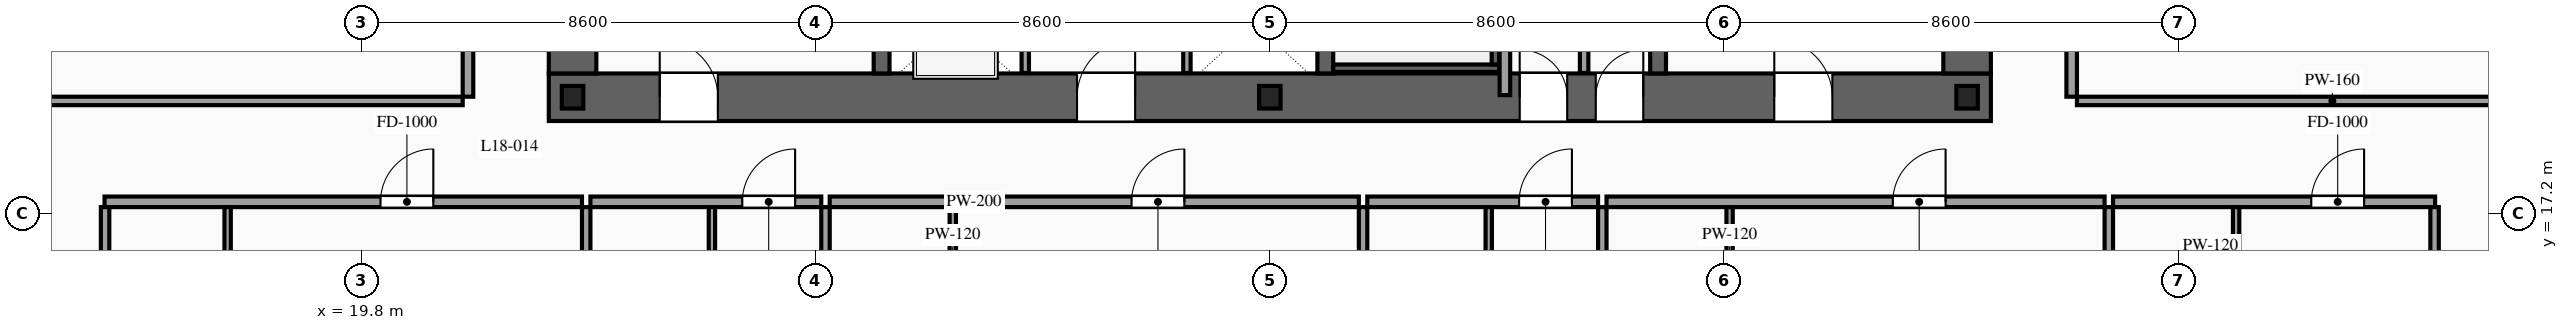
"""IFC4 building model, lengths in metres.
Left out: names, types, materials, properties, quantities, classifications, styles, units other than length and angle.
Written with IfcOpenShell. Run it as: python <this file> out.ifc"""

import sys

from ifc_helpers import new_model, si_unit, direction, frame, frame_2d, origin, origin_2d, place, context, subcontext, project, spatial, rectangle, i_section, extrude, source, transform, mapped, element, fill, save


model = new_model("IFC4")
c1 = context("Model", 3, precision=1e-05, world=origin(), true_north=direction((0.0, 1.0)))
c2 = subcontext(c1, "Body", "Model", "MODEL_VIEW")
j1 = project(units=[si_unit("LENGTHUNIT", "METRE"), si_unit("PLANEANGLEUNIT", "RADIAN")], contexts=[c1])
p1 = place(None, origin())
s1 = spatial("IfcSite", under=j1, at=p1, CompositionType="ELEMENT")
p2 = place(p1, origin())
s2 = spatial("IfcBuilding", under=s1, at=p2, CompositionType="ELEMENT")
p3 = place(p2, frame((0.0, 0.0, 71.2)))
s3 = spatial("IfcBuildingStorey", under=s2, at=p3, CompositionType="ELEMENT", Elevation=71.2)
p4 = place(p3, frame((23.35, 19.4, 0.0), z_axis=(0.0, 0.0, 1.0), x_axis=(1.0, 0.0, 0.0)))
e1 = element("IfcWall", 1, at=p4, inside=s3, PredefinedType="SHEAR", context=c2, shape_type="SweptSolid", body=[
    extrude(rectangle(XDim=27.3, YDim=0.9, at=frame_2d((13.65, 0.0))), origin(), (0.0, 0.0, 1.0), 3.6),
])
p5 = place(p4, frame((2.1, 0.0, 0.0)))
e2 = element("IfcOpeningElement", 2, at=p5, cuts=e1, PredefinedType="OPENING", context=c2, shape_type="SweptSolid", body=[
    extrude(rectangle(XDim=1.1, YDim=2.2, at=frame_2d((0.55, 1.1))), frame((0.0, 0.465, 0.0), z_axis=(0.0, -1.0, 0.0), x_axis=(1.0, 0.0, 0.0)), (0.0, 0.0, 1.0), 0.93),
])
p6 = place(p4, frame((10.0, 0.0, 0.0)))
e3 = element("IfcOpeningElement", 3, at=p6, cuts=e1, PredefinedType="OPENING", context=c2, shape_type="SweptSolid", body=[
    extrude(rectangle(XDim=1.1, YDim=2.2, at=frame_2d((0.55, 1.1))), frame((0.0, 0.465, 0.0), z_axis=(0.0, -1.0, 0.0), x_axis=(1.0, 0.0, 0.0)), (0.0, 0.0, 1.0), 0.93),
])
p7 = place(p4, frame((23.2, 0.0, 0.0)))
e4 = element("IfcOpeningElement", 4, at=p7, cuts=e1, PredefinedType="OPENING", context=c2, shape_type="SweptSolid", body=[
    extrude(rectangle(XDim=1.1, YDim=2.2, at=frame_2d((0.55, 1.1))), frame((0.0, 0.465, 0.0), z_axis=(0.0, -1.0, 0.0), x_axis=(1.0, 0.0, 0.0)), (0.0, 0.0, 1.0), 0.93),
])
p8 = place(p4, frame((19.82, 0.0, 0.0)))
e5 = element("IfcOpeningElement", 5, at=p8, cuts=e1, PredefinedType="OPENING", context=c2, shape_type="SweptSolid", body=[
    extrude(rectangle(XDim=0.9, YDim=2.15, at=frame_2d((0.45, 1.075))), frame((0.0, 0.465, 0.0), z_axis=(0.0, -1.0, 0.0), x_axis=(1.0, 0.0, 0.0)), (0.0, 0.0, 1.0), 0.93),
])
p9 = place(p4, frame((18.38, 0.0, 0.0)))
e6 = element("IfcOpeningElement", 6, at=p9, cuts=e1, PredefinedType="OPENING", context=c2, shape_type="SweptSolid", body=[
    extrude(rectangle(XDim=0.9, YDim=2.15, at=frame_2d((0.45, 1.075))), frame((0.0, 0.465, 0.0), z_axis=(0.0, -1.0, 0.0), x_axis=(1.0, 0.0, 0.0)), (0.0, 0.0, 1.0), 0.93),
])
m1 = source(origin(), c2, "Body", "SweptSolid", [
    extrude(rectangle(XDim=11.9, YDim=0.9, at=frame_2d((5.95, 0.0))), origin(), (0.0, 0.0, 1.0), 3.6),
])
for number, where, z_axis, x_axis in (
    (7, (23.8, 19.85, 0.0), (0.0, 0.0, 1.0), (0.0, 1.0, 0.0)),
    (8, (50.2, 19.85, 0.0), (0.0, 0.0, 1.0), (0.0, 1.0, 0.0)),
):
    element("IfcWall", number, at=place(p3, frame(where, z_axis=z_axis, x_axis=x_axis)), inside=s3, PredefinedType="SHEAR", context=c2, shape_type="MappedRepresentation", body=[
        mapped(m1, transform((0.0, 0.0, 0.0), scale=1.0)),
    ])
m2 = source(origin(), c2, "Body", "SweptSolid", [
    extrude(rectangle(XDim=11.9, YDim=0.3, at=frame_2d((5.95, 0.0))), origin(), (0.0, 0.0, 1.0), 3.6),
])
for number, where, z_axis, x_axis in (
    (9, (29.65, 19.85, 0.0), (0.0, 0.0, 1.0), (0.0, 1.0, 0.0)),
    (10, (38.05, 19.85, 0.0), (0.0, 0.0, 1.0), (0.0, 1.0, 0.0)),
    (11, (44.35, 19.85, 0.0), (0.0, 0.0, 1.0), (0.0, 1.0, 0.0)),
):
    element("IfcWall", number, at=place(p3, frame(where, z_axis=z_axis, x_axis=x_axis)), inside=s3, PredefinedType="SOLIDWALL", context=c2, shape_type="MappedRepresentation", body=[
        mapped(m2, transform((0.0, 0.0, 0.0), scale=1.0)),
    ])
m3 = source(origin(), c2, "Body", "SweptSolid", [
    extrude(i_section(OverallWidth=0.407, OverallDepth=0.428, WebThickness=0.02, FlangeThickness=0.035, at=origin_2d()), origin(), (0.0, 0.0, 1.0), 3.6),
])
for number, where, z_axis, x_axis in (
    (12, (23.8, 19.4, 0.0), (0.0, 0.0, 1.0), (1.0, 0.0, 0.0)),
    (13, (37.0, 19.4, 0.0), (0.0, 0.0, 1.0), (1.0, 0.0, 0.0)),
    (14, (50.2, 19.4, 0.0), (0.0, 0.0, 1.0), (1.0, 0.0, 0.0)),
):
    element("IfcColumn", number, at=place(p3, frame(where, z_axis=z_axis, x_axis=x_axis)), inside=s3, PredefinedType="COLUMN", context=c2, shape_type="MappedRepresentation", body=[
        mapped(m3, transform((0.0, 0.0, 0.0), scale=1.0)),
    ])
p10 = place(p3, frame((32.37, 19.86, 0.0), z_axis=(0.0, 0.0, 1.0), x_axis=(0.0, 1.0, 0.0)))
e15 = element("IfcWall", 15, at=p10, inside=s3, PredefinedType="SOLIDWALL", context=c2, shape_type="SweptSolid", body=[
    extrude(rectangle(XDim=2.04, YDim=0.14, at=frame_2d((1.02, 0.0))), origin(), (0.0, 0.0, 1.0), 3.38),
])
p11 = place(p10, frame((0.47, 0.0, 0.0)))
e16 = element("IfcOpeningElement", 16, at=p11, cuts=e15, PredefinedType="OPENING", context=c2, shape_type="SweptSolid", body=[
    extrude(rectangle(XDim=1.1, YDim=2.2, at=frame_2d((0.55, 1.1))), frame((0.0, 0.085, 0.0), z_axis=(0.0, -1.0, 0.0), x_axis=(1.0, 0.0, 0.0)), (0.0, 0.0, 1.0), 0.17),
])
m4 = source(origin(), c2, "Body", "SweptSolid", [
    extrude(rectangle(XDim=2.04, YDim=0.14, at=frame_2d((1.02, 0.0))), origin(), (0.0, 0.0, 1.0), 3.38),
])
p12 = place(p3, frame((35.43, 19.86, 0.0), z_axis=(0.0, 0.0, 1.0), x_axis=(0.0, 1.0, 0.0)))
e17 = element("IfcWall", 17, at=p12, inside=s3, PredefinedType="SOLIDWALL", context=c2, shape_type="MappedRepresentation", body=[
    mapped(m4, transform((0.0, 0.0, 0.0), scale=1.0)),
])
m5 = source(origin(), c2, "Body", "SweptSolid", [
    extrude(rectangle(XDim=3.14, YDim=0.14, at=frame_2d((1.57, 0.0))), origin(), (0.0, 0.0, 1.0), 3.38),
])
p13 = place(p3, frame((38.2, 19.95, 0.0), z_axis=(0.0, 0.0, 1.0), x_axis=(1.0, 0.0, 0.0)))
e18 = element("IfcWall", 18, at=p13, inside=s3, PredefinedType="SOLIDWALL", context=c2, shape_type="MappedRepresentation", body=[
    mapped(m5, transform((0.0, 0.0, 0.0), scale=1.0)),
])
m6 = source(origin(), c2, "Body", "SweptSolid", [
    extrude(rectangle(XDim=8.94, YDim=0.14, at=frame_2d((4.47, 0.0))), origin(), (0.0, 0.0, 1.0), 3.38),
])
p14 = place(p3, frame((41.27, 20.02, 0.0), z_axis=(0.0, 0.0, 1.0), x_axis=(0.0, 1.0, 0.0)))
e19 = element("IfcWall", 19, at=p14, inside=s3, PredefinedType="SOLIDWALL", context=c2, shape_type="MappedRepresentation", body=[
    mapped(m6, transform((0.0, 0.0, 0.0), scale=1.0)),
])
m7 = source(origin(), c2, "Body", "SweptSolid", [
    extrude(rectangle(XDim=1.34, YDim=0.16, at=frame_2d((0.67, 0.0))), origin(), (0.0, 0.0, 1.0), 3.38),
])
p15 = place(p3, frame((42.95, 19.86, 0.0), z_axis=(0.0, 0.0, 1.0), x_axis=(0.0, 1.0, 0.0)))
e20 = element("IfcWall", 20, at=p15, inside=s3, PredefinedType="PARTITIONING", context=c2, shape_type="MappedRepresentation", body=[
    mapped(m7, transform((0.0, 0.0, 0.0), scale=1.0)),
])
m8 = source(origin(), c2, "Body", "SweptSolid", [
    extrude(rectangle(XDim=6.51, YDim=0.2, at=frame_2d((3.255, 0.0))), origin(), (0.0, 0.0, 1.0), 3.38),
])
p16 = place(p3, frame((41.45, 19.44, 0.0), z_axis=(0.0, 0.0, 1.0), x_axis=(0.0, 1.0, 0.0)))
e21 = element("IfcWall", 21, at=p16, inside=s3, PredefinedType="PARTITIONING", context=c2, shape_type="MappedRepresentation", body=[
    mapped(m8, transform((0.0, 0.0, 0.0), scale=1.0)),
])
p17 = place(p3, frame((14.94, 17.42, 0.0), z_axis=(0.0, 0.0, 1.0), x_axis=(1.0, 0.0, 0.0)))
e22 = element("IfcWall", 22, at=p17, inside=s3, PredefinedType="PARTITIONING", context=c2, shape_type="SweptSolid", body=[
    extrude(rectangle(XDim=9.038, YDim=0.2, at=frame_2d((4.519, 0.0))), origin(), (0.0, 0.0, 1.0), 3.38),
])
p18 = place(p17, frame((5.224, 0.0, 0.0)))
e23 = element("IfcOpeningElement", 23, at=p18, cuts=e22, PredefinedType="OPENING", context=c2, shape_type="SweptSolid", body=[
    extrude(rectangle(XDim=1.0, YDim=2.2, at=frame_2d((0.5, 1.1))), frame((0.0, 0.115, 0.0), z_axis=(0.0, -1.0, 0.0), x_axis=(1.0, 0.0, 0.0)), (0.0, 0.0, 1.0), 0.23),
])
m9 = source(origin(), c2, "Body", "SweptSolid", [
    extrude(rectangle(XDim=16.47, YDim=0.16, at=frame_2d((8.235, 0.0))), origin(), (0.0, 0.0, 1.0), 3.38),
])
p19 = place(p3, frame((24.058, 0.85, 0.0), z_axis=(0.0, 0.0, 1.0), x_axis=(0.0, 1.0, 0.0)))
e24 = element("IfcWall", 24, at=p19, inside=s3, PredefinedType="PARTITIONING", context=c2, shape_type="MappedRepresentation", body=[
    mapped(m9, transform((0.0, 0.0, 0.0), scale=1.0)),
])
m10 = source(origin(), c2, "Body", "SweptSolid", [
    extrude(rectangle(XDim=2.42, YDim=0.12, at=frame_2d((1.21, 0.0))), origin(), (0.0, 0.0, 1.0), 3.38),
])
p20 = place(p3, frame((17.27, 14.9, 0.0), z_axis=(0.0, 0.0, 1.0), x_axis=(0.0, 1.0, 0.0)))
e25 = element("IfcWall", 25, at=p20, inside=s3, PredefinedType="PARTITIONING", context=c2, shape_type="MappedRepresentation", body=[
    mapped(m10, transform((0.0, 0.0, 0.0), scale=1.0)),
])
p21 = place(p3, frame((24.138, 17.42, 0.0), z_axis=(0.0, 0.0, 1.0), x_axis=(1.0, 0.0, 0.0)))
e26 = element("IfcWall", 26, at=p21, inside=s3, PredefinedType="PARTITIONING", context=c2, shape_type="SweptSolid", body=[
    extrude(rectangle(XDim=4.37, YDim=0.2, at=frame_2d((2.185, 0.0))), origin(), (0.0, 0.0, 1.0), 3.38),
])
p22 = place(p21, frame((2.875, 0.0, 0.0)))
e27 = element("IfcOpeningElement", 27, at=p22, cuts=e26, PredefinedType="OPENING", context=c2, shape_type="SweptSolid", body=[
    extrude(rectangle(XDim=1.0, YDim=2.2, at=frame_2d((0.5, 1.1))), frame((0.0, 0.115, 0.0), z_axis=(0.0, -1.0, 0.0), x_axis=(1.0, 0.0, 0.0)), (0.0, 0.0, 1.0), 0.23),
])
p23 = place(p3, frame((28.588, 0.85, 0.0), z_axis=(0.0, 0.0, 1.0), x_axis=(0.0, 1.0, 0.0)))
e28 = element("IfcWall", 28, at=p23, inside=s3, PredefinedType="PARTITIONING", context=c2, shape_type="MappedRepresentation", body=[
    mapped(m9, transform((0.0, 0.0, 0.0), scale=1.0)),
])
p24 = place(p3, frame((26.438, 14.9, 0.0), z_axis=(0.0, 0.0, 1.0), x_axis=(0.0, 1.0, 0.0)))
e29 = element("IfcWall", 29, at=p24, inside=s3, PredefinedType="PARTITIONING", context=c2, shape_type="MappedRepresentation", body=[
    mapped(m10, transform((0.0, 0.0, 0.0), scale=1.0)),
])
p25 = place(p3, frame((28.668, 17.42, 0.0), z_axis=(0.0, 0.0, 1.0), x_axis=(1.0, 0.0, 0.0)))
e30 = element("IfcWall", 30, at=p25, inside=s3, PredefinedType="PARTITIONING", context=c2, shape_type="SweptSolid", body=[
    extrude(rectangle(XDim=10.017, YDim=0.2, at=frame_2d((5.009, 0.0))), origin(), (0.0, 0.0, 1.0), 3.38),
])
p26 = place(p25, frame((5.714, 0.0, 0.0)))
e31 = element("IfcOpeningElement", 31, at=p26, cuts=e30, PredefinedType="OPENING", context=c2, shape_type="SweptSolid", body=[
    extrude(rectangle(XDim=1.0, YDim=2.2, at=frame_2d((0.5, 1.1))), frame((0.0, 0.115, 0.0), z_axis=(0.0, -1.0, 0.0), x_axis=(1.0, 0.0, 0.0)), (0.0, 0.0, 1.0), 0.23),
])
p27 = place(p3, frame((38.765, 0.85, 0.0), z_axis=(0.0, 0.0, 1.0), x_axis=(0.0, 1.0, 0.0)))
e32 = element("IfcWall", 32, at=p27, inside=s3, PredefinedType="PARTITIONING", context=c2, shape_type="MappedRepresentation", body=[
    mapped(m9, transform((0.0, 0.0, 0.0), scale=1.0)),
])
p28 = place(p3, frame((30.998, 14.9, 0.0), z_axis=(0.0, 0.0, 1.0), x_axis=(0.0, 1.0, 0.0)))
e33 = element("IfcWall", 33, at=p28, inside=s3, PredefinedType="PARTITIONING", context=c2, shape_type="MappedRepresentation", body=[
    mapped(m10, transform((0.0, 0.0, 0.0), scale=1.0)),
])
p29 = place(p3, frame((38.845, 17.42, 0.0), z_axis=(0.0, 0.0, 1.0), x_axis=(1.0, 0.0, 0.0)))
e34 = element("IfcWall", 34, at=p29, inside=s3, PredefinedType="PARTITIONING", context=c2, shape_type="SweptSolid", body=[
    extrude(rectangle(XDim=4.369, YDim=0.2, at=frame_2d((2.185, 0.0))), origin(), (0.0, 0.0, 1.0), 3.38),
])
p30 = place(p29, frame((2.874, 0.0, 0.0)))
e35 = element("IfcOpeningElement", 35, at=p30, cuts=e34, PredefinedType="OPENING", context=c2, shape_type="SweptSolid", body=[
    extrude(rectangle(XDim=1.0, YDim=2.2, at=frame_2d((0.5, 1.1))), frame((0.0, 0.115, 0.0), z_axis=(0.0, -1.0, 0.0), x_axis=(1.0, 0.0, 0.0)), (0.0, 0.0, 1.0), 0.23),
])
p31 = place(p3, frame((43.294, 0.85, 0.0), z_axis=(0.0, 0.0, 1.0), x_axis=(0.0, 1.0, 0.0)))
e36 = element("IfcWall", 36, at=p31, inside=s3, PredefinedType="PARTITIONING", context=c2, shape_type="MappedRepresentation", body=[
    mapped(m9, transform((0.0, 0.0, 0.0), scale=1.0)),
])
p32 = place(p3, frame((41.144, 14.9, 0.0), z_axis=(0.0, 0.0, 1.0), x_axis=(0.0, 1.0, 0.0)))
e37 = element("IfcWall", 37, at=p32, inside=s3, PredefinedType="PARTITIONING", context=c2, shape_type="MappedRepresentation", body=[
    mapped(m10, transform((0.0, 0.0, 0.0), scale=1.0)),
])
p33 = place(p3, frame((43.374, 17.42, 0.0), z_axis=(0.0, 0.0, 1.0), x_axis=(1.0, 0.0, 0.0)))
e38 = element("IfcWall", 38, at=p33, inside=s3, PredefinedType="PARTITIONING", context=c2, shape_type="SweptSolid", body=[
    extrude(rectangle(XDim=9.429, YDim=0.2, at=frame_2d((4.714, 0.0))), origin(), (0.0, 0.0, 1.0), 3.38),
])
p34 = place(p33, frame((5.419, 0.0, 0.0)))
e39 = element("IfcOpeningElement", 39, at=p34, cuts=e38, PredefinedType="OPENING", context=c2, shape_type="SweptSolid", body=[
    extrude(rectangle(XDim=1.0, YDim=2.2, at=frame_2d((0.5, 1.1))), frame((0.0, 0.115, 0.0), z_axis=(0.0, -1.0, 0.0), x_axis=(1.0, 0.0, 0.0)), (0.0, 0.0, 1.0), 0.23),
])
p35 = place(p3, frame((52.883, 0.85, 0.0), z_axis=(0.0, 0.0, 1.0), x_axis=(0.0, 1.0, 0.0)))
e40 = element("IfcWall", 40, at=p35, inside=s3, PredefinedType="PARTITIONING", context=c2, shape_type="MappedRepresentation", body=[
    mapped(m9, transform((0.0, 0.0, 0.0), scale=1.0)),
])
p36 = place(p3, frame((45.704, 14.9, 0.0), z_axis=(0.0, 0.0, 1.0), x_axis=(0.0, 1.0, 0.0)))
e41 = element("IfcWall", 41, at=p36, inside=s3, PredefinedType="PARTITIONING", context=c2, shape_type="MappedRepresentation", body=[
    mapped(m10, transform((0.0, 0.0, 0.0), scale=1.0)),
])
p37 = place(p3, frame((52.963, 17.42, 0.0), z_axis=(0.0, 0.0, 1.0), x_axis=(1.0, 0.0, 0.0)))
e42 = element("IfcWall", 42, at=p37, inside=s3, PredefinedType="PARTITIONING", context=c2, shape_type="SweptSolid", body=[
    extrude(rectangle(XDim=6.097, YDim=0.2, at=frame_2d((3.049, 0.0))), origin(), (0.0, 0.0, 1.0), 3.38),
])
p38 = place(p37, frame((3.753, 0.0, 0.0)))
e43 = element("IfcOpeningElement", 43, at=p38, cuts=e42, PredefinedType="OPENING", context=c2, shape_type="SweptSolid", body=[
    extrude(rectangle(XDim=1.0, YDim=2.2, at=frame_2d((0.5, 1.1))), frame((0.0, 0.115, 0.0), z_axis=(0.0, -1.0, 0.0), x_axis=(1.0, 0.0, 0.0)), (0.0, 0.0, 1.0), 0.23),
])
m11 = source(origin(), c2, "Body", "SweptSolid", [
    extrude(rectangle(XDim=16.32, YDim=0.16, at=frame_2d((8.16, 0.0))), origin(), (0.0, 0.0, 1.0), 3.38),
])
for number, where, z_axis, x_axis in (
    (44, (14.95, 1.0, 0.0), (0.0, 0.0, 1.0), (0.0, 1.0, 0.0)),
    (45, (59.05, 1.0, 0.0), (0.0, 0.0, 1.0), (0.0, 1.0, 0.0)),
):
    element("IfcWall", number, at=place(p3, frame(where, z_axis=z_axis, x_axis=x_axis)), inside=s3, PredefinedType="PARTITIONING", context=c2, shape_type="MappedRepresentation", body=[
        mapped(m11, transform((0.0, 0.0, 0.0), scale=1.0)),
    ])
p39 = place(p3, frame((55.293, 14.9, 0.0), z_axis=(0.0, 0.0, 1.0), x_axis=(0.0, 1.0, 0.0)))
e46 = element("IfcWall", 46, at=p39, inside=s3, PredefinedType="PARTITIONING", context=c2, shape_type="MappedRepresentation", body=[
    mapped(m10, transform((0.0, 0.0, 0.0), scale=1.0)),
])
p40 = place(p3, frame((21.82, 19.41, 0.0), z_axis=(0.0, 0.0, 1.0), x_axis=(0.0, 1.0, 0.0)))
e47 = element("IfcWall", 47, at=p40, inside=s3, PredefinedType="PARTITIONING", context=c2, shape_type="SweptSolid", body=[
    extrude(rectangle(XDim=6.31, YDim=0.2, at=frame_2d((3.155, 0.0))), origin(), (0.0, 0.0, 1.0), 3.38),
])
p41 = place(p40, frame((2.655, 0.0, 0.0)))
e48 = element("IfcOpeningElement", 48, at=p41, cuts=e47, PredefinedType="OPENING", context=c2, shape_type="SweptSolid", body=[
    extrude(rectangle(XDim=1.0, YDim=2.2, at=frame_2d((0.5, 1.1))), frame((0.0, 0.115, 0.0), z_axis=(0.0, -1.0, 0.0), x_axis=(1.0, 0.0, 0.0)), (0.0, 0.0, 1.0), 0.23),
])
m12 = source(origin(), c2, "Body", "SweptSolid", [
    extrude(rectangle(XDim=9.67, YDim=0.16, at=frame_2d((4.835, 0.0))), origin(), (0.0, 0.0, 1.0), 2.875),
])
p42 = place(p3, frame((12.05, 19.33, 0.0), z_axis=(0.0, 0.0, 1.0), x_axis=(1.0, 0.0, 0.0)))
e49 = element("IfcWall", 49, at=p42, inside=s3, PredefinedType="PARTITIONING", context=c2, shape_type="MappedRepresentation", body=[
    mapped(m12, transform((0.0, 0.0, 0.0), scale=1.0)),
])
p43 = place(p3, frame((52.18, 19.41, 0.0), z_axis=(0.0, 0.0, 1.0), x_axis=(0.0, 1.0, 0.0)))
e50 = element("IfcWall", 50, at=p43, inside=s3, PredefinedType="PARTITIONING", context=c2, shape_type="SweptSolid", body=[
    extrude(rectangle(XDim=6.31, YDim=0.2, at=frame_2d((3.155, 0.0))), origin(), (0.0, 0.0, 1.0), 3.38),
])
p44 = place(p43, frame((2.655, 0.0, 0.0)))
e51 = element("IfcOpeningElement", 51, at=p44, cuts=e50, PredefinedType="OPENING", context=c2, shape_type="SweptSolid", body=[
    extrude(rectangle(XDim=1.0, YDim=2.2, at=frame_2d((0.5, 1.1))), frame((0.0, 0.115, 0.0), z_axis=(0.0, -1.0, 0.0), x_axis=(1.0, 0.0, 0.0)), (0.0, 0.0, 1.0), 0.23),
])
p45 = place(p3, frame((52.28, 19.33, 0.0), z_axis=(0.0, 0.0, 1.0), x_axis=(1.0, 0.0, 0.0)))
e52 = element("IfcWall", 52, at=p45, inside=s3, PredefinedType="PARTITIONING", context=c2, shape_type="MappedRepresentation", body=[
    mapped(m12, transform((0.0, 0.0, 0.0), scale=1.0)),
])
m13 = source(origin(), c2, "Body", "SweptSolid", [
    extrude(rectangle(XDim=1.1, YDim=2.2, at=frame_2d((0.55, 1.1))), frame((0.0, 0.025, 0.0), z_axis=(0.0, -1.0, 0.0), x_axis=(1.0, 0.0, 0.0)), (0.0, 0.0, 1.0), 0.05),
])
p46 = place(p5, origin())
e53 = element("IfcDoor", 53, at=p46, inside=s3, OperationType="SINGLE_SWING_LEFT", PredefinedType="DOOR", context=c2, shape_type="MappedRepresentation", body=[
    mapped(m13, transform((0.0, 0.0, 0.0), scale=1.0)),
])
fill(e2, e53)
p47 = place(p6, origin())
e54 = element("IfcDoor", 54, at=p47, inside=s3, OperationType="SINGLE_SWING_RIGHT", PredefinedType="DOOR", context=c2, shape_type="MappedRepresentation", body=[
    mapped(m13, transform((0.0, 0.0, 0.0), scale=1.0)),
])
fill(e3, e54)
p48 = place(p7, origin())
e55 = element("IfcDoor", 55, at=p48, inside=s3, OperationType="SINGLE_SWING_LEFT", PredefinedType="DOOR", context=c2, shape_type="MappedRepresentation", body=[
    mapped(m13, transform((0.0, 0.0, 0.0), scale=1.0)),
])
fill(e4, e55)
m14 = source(origin(), c2, "Body", "SweptSolid", [
    extrude(rectangle(XDim=0.9, YDim=2.15, at=frame_2d((0.45, 1.075))), frame((0.0, 0.025, 0.0), z_axis=(0.0, -1.0, 0.0), x_axis=(1.0, 0.0, 0.0)), (0.0, 0.0, 1.0), 0.05),
])
p49 = place(p8, origin())
e56 = element("IfcDoor", 56, at=p49, inside=s3, OperationType="SINGLE_SWING_RIGHT", PredefinedType="DOOR", context=c2, shape_type="MappedRepresentation", body=[
    mapped(m14, transform((0.0, 0.0, 0.0), scale=1.0)),
])
fill(e5, e56)
p50 = place(p9, origin())
e57 = element("IfcDoor", 57, at=p50, inside=s3, OperationType="SINGLE_SWING_LEFT", PredefinedType="DOOR", context=c2, shape_type="MappedRepresentation", body=[
    mapped(m14, transform((0.0, 0.0, 0.0), scale=1.0)),
])
fill(e6, e57)
m15 = source(origin(), c2, "Body", "SweptSolid", [
    extrude(rectangle(XDim=1.0, YDim=2.2, at=frame_2d((0.5, 1.1))), frame((0.0, 0.025, 0.0), z_axis=(0.0, -1.0, 0.0), x_axis=(1.0, 0.0, 0.0)), (0.0, 0.0, 1.0), 0.05),
])
p51 = place(p18, origin())
e58 = element("IfcDoor", 58, at=p51, inside=s3, OperationType="SINGLE_SWING_RIGHT", PredefinedType="DOOR", context=c2, shape_type="MappedRepresentation", body=[
    mapped(m15, transform((0.0, 0.0, 0.0), scale=1.0)),
])
fill(e23, e58)
p52 = place(p22, origin())
e59 = element("IfcDoor", 59, at=p52, inside=s3, OperationType="SINGLE_SWING_RIGHT", PredefinedType="DOOR", context=c2, shape_type="MappedRepresentation", body=[
    mapped(m15, transform((0.0, 0.0, 0.0), scale=1.0)),
])
fill(e27, e59)
p53 = place(p26, origin())
e60 = element("IfcDoor", 60, at=p53, inside=s3, OperationType="SINGLE_SWING_RIGHT", PredefinedType="DOOR", context=c2, shape_type="MappedRepresentation", body=[
    mapped(m15, transform((0.0, 0.0, 0.0), scale=1.0)),
])
fill(e31, e60)
p54 = place(p30, origin())
e61 = element("IfcDoor", 61, at=p54, inside=s3, OperationType="SINGLE_SWING_RIGHT", PredefinedType="DOOR", context=c2, shape_type="MappedRepresentation", body=[
    mapped(m15, transform((0.0, 0.0, 0.0), scale=1.0)),
])
fill(e35, e61)
p55 = place(p34, origin())
e62 = element("IfcDoor", 62, at=p55, inside=s3, OperationType="SINGLE_SWING_RIGHT", PredefinedType="DOOR", context=c2, shape_type="MappedRepresentation", body=[
    mapped(m15, transform((0.0, 0.0, 0.0), scale=1.0)),
])
fill(e39, e62)
p56 = place(p38, origin())
e63 = element("IfcDoor", 63, at=p56, inside=s3, OperationType="SINGLE_SWING_RIGHT", PredefinedType="DOOR", context=c2, shape_type="MappedRepresentation", body=[
    mapped(m15, transform((0.0, 0.0, 0.0), scale=1.0)),
])
fill(e43, e63)
save(model, sys.argv[1])
